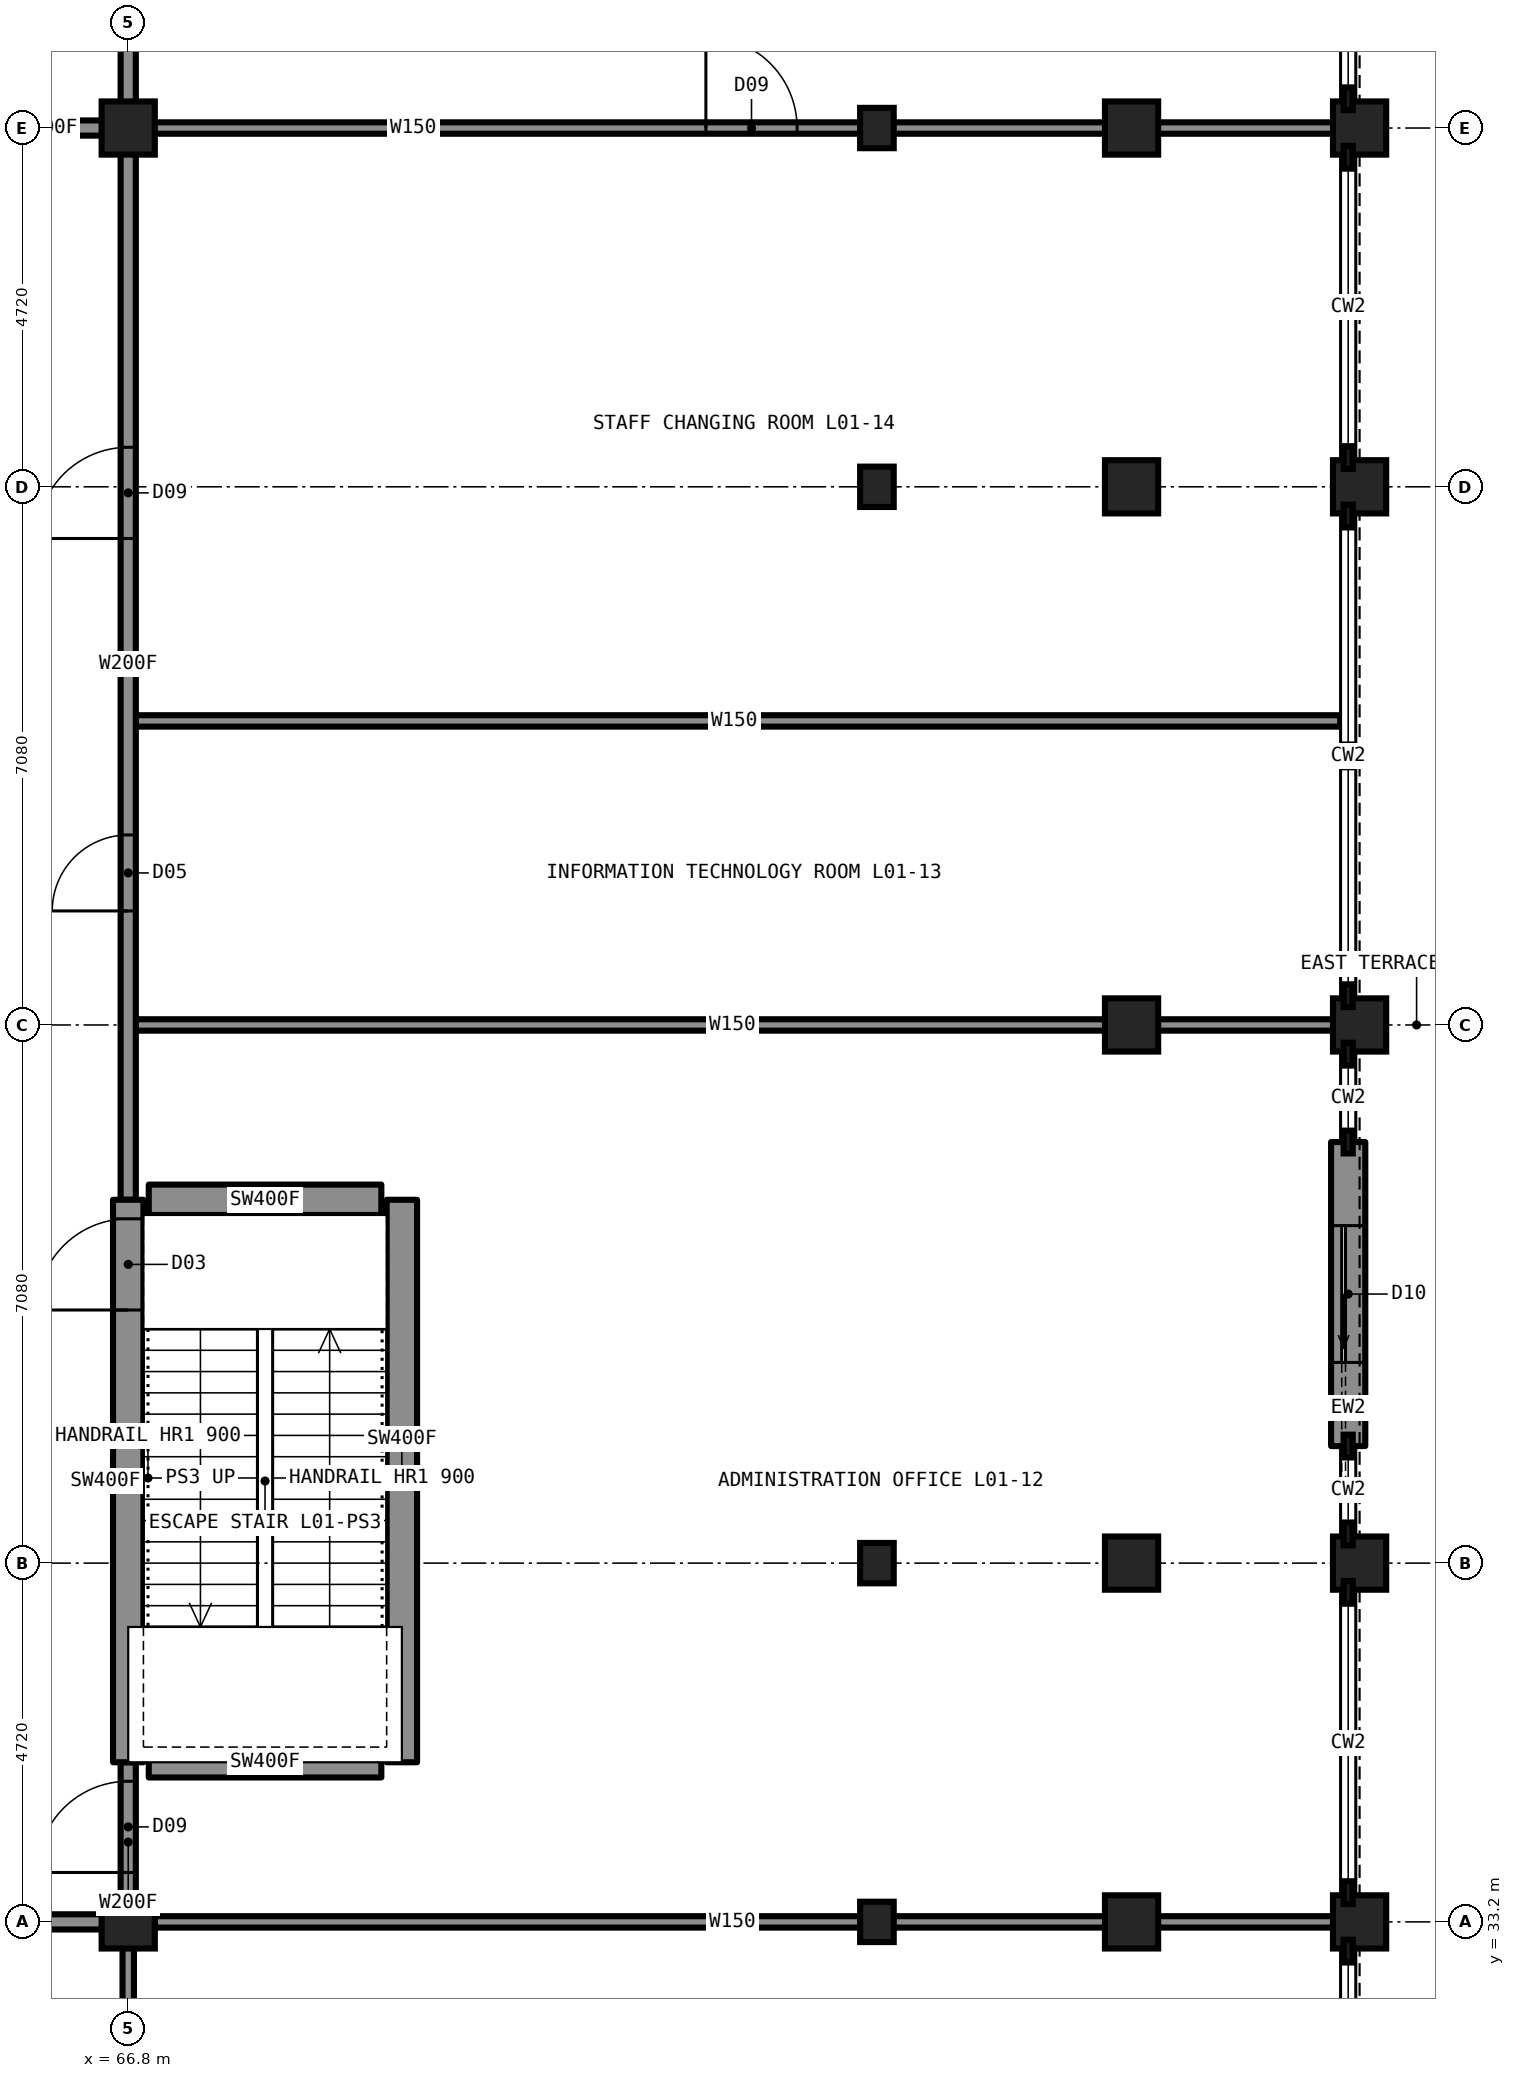
"""IFC4 building model, lengths in metres.
Left out: names, types, materials, properties, quantities, classifications, styles, units other than length and angle.
Written with IfcOpenShell. Run it as: python <this file> out.ifc"""

import sys

from ifc_helpers import new_model, si_unit, direction, frame, frame_2d, origin, origin_2d, place, context, subcontext, project, spatial, rectangle, hollow_rectangle, i_section, extrude, element, fill, save


model = new_model("IFC4")
c1 = context("Model", 3, precision=1e-05, world=origin(), true_north=direction((0.0, 1.0)))
c2 = subcontext(c1, "Body", "Model", "MODEL_VIEW")
j1 = project(units=[si_unit("LENGTHUNIT", "METRE"), si_unit("PLANEANGLEUNIT", "RADIAN")], contexts=[c1])
p1 = place(None, origin())
s1 = spatial("IfcSite", under=j1, at=p1, CompositionType="ELEMENT")
p2 = place(p1, origin())
s2 = spatial("IfcBuilding", under=s1, at=p2, CompositionType="ELEMENT")
p3 = place(p2, frame((0.0, 0.0, 5.6)))
s3 = spatial("IfcBuildingStorey", under=s2, at=p3, CompositionType="ELEMENT", Elevation=5.6)
for number, where, z_axis, x_axis in (
    (1, (76.65, 33.2, 0.0), (0.0, 0.0, 1.0), (1.0, 0.0, 0.0)),
    (2, (76.65, 37.92, 0.0), (0.0, 0.0, 1.0), (1.0, 0.0, 0.0)),
    (3, (76.65, 52.08, 0.0), (0.0, 0.0, 1.0), (1.0, 0.0, 0.0)),
    (4, (76.65, 56.8, 0.0), (0.0, 0.0, 1.0), (1.0, 0.0, 0.0)),
):
    element("IfcColumn", number, at=place(p3, frame(where, z_axis=z_axis, x_axis=x_axis)), inside=s3, PredefinedType="COLUMN", context=c2, shape_type="SweptSolid", body=[
        extrude(i_section(OverallWidth=0.442, OverallDepth=0.531, WebThickness=0.066, FlangeThickness=0.106, at=origin_2d()), origin(), (0.0, 0.0, 1.0), 5.4),
    ])
for number, where, z_axis, x_axis in (
    (5, (66.8, 33.2, 0.0), (0.0, 0.0, 1.0), (1.0, 0.0, 0.0)),
    (6, (66.8, 56.8, 0.0), (0.0, 0.0, 1.0), (1.0, 0.0, 0.0)),
):
    element("IfcColumn", number, at=place(p3, frame(where, z_axis=z_axis, x_axis=x_axis)), inside=s3, PredefinedType="COLUMN", context=c2, shape_type="SweptSolid", body=[
        extrude(hollow_rectangle(XDim=0.7, YDim=0.7, WallThickness=0.06, at=origin_2d()), origin(), (0.0, 0.0, 1.0), 5.4),
    ])
for number, where, z_axis, x_axis in (
    (7, (80.0, 33.2, 0.0), (0.0, 0.0, 1.0), (1.0, 0.0, 0.0)),
    (8, (80.0, 37.92, 0.0), (0.0, 0.0, 1.0), (1.0, 0.0, 0.0)),
    (9, (80.0, 45.0, 0.0), (0.0, 0.0, 1.0), (1.0, 0.0, 0.0)),
    (10, (80.0, 52.08, 0.0), (0.0, 0.0, 1.0), (1.0, 0.0, 0.0)),
    (11, (80.0, 56.8, 0.0), (0.0, 0.0, 1.0), (1.0, 0.0, 0.0)),
    (12, (83.0, 33.2, 0.0), (0.0, 0.0, 1.0), (1.0, 0.0, 0.0)),
    (13, (83.0, 37.92, 0.0), (0.0, 0.0, 1.0), (1.0, 0.0, 0.0)),
    (14, (83.0, 45.0, 0.0), (0.0, 0.0, 1.0), (1.0, 0.0, 0.0)),
    (15, (83.0, 52.08, 0.0), (0.0, 0.0, 1.0), (1.0, 0.0, 0.0)),
    (16, (83.0, 56.8, 0.0), (0.0, 0.0, 1.0), (1.0, 0.0, 0.0)),
):
    element("IfcColumn", number, at=place(p3, frame(where, z_axis=z_axis, x_axis=x_axis)), inside=s3, PredefinedType="COLUMN", context=c2, shape_type="SweptSolid", body=[
        extrude(rectangle(XDim=0.7, YDim=0.7, at=origin_2d()), origin(), (0.0, 0.0, 1.0), 5.4),
    ])
p4 = place(p3, frame((52.7, 33.2, 0.0), z_axis=(0.0, 0.0, 1.0), x_axis=(1.0, 0.0, 0.0)))
e17 = element("IfcWall", 17, at=p4, inside=s3, PredefinedType="PARTITIONING", context=c2, shape_type="SweptSolid", body=[
    extrude(rectangle(XDim=14.1, YDim=0.2, at=frame_2d((7.05, 0.0))), origin(), (0.0, 0.0, 1.0), 5.05),
])
p5 = place(p4, frame((5.4, 0.0, 0.0)))
e18 = element("IfcOpeningElement", 18, at=p5, cuts=e17, PredefinedType="OPENING", context=c2, shape_type="SweptSolid", body=[
    extrude(rectangle(XDim=1.8, YDim=2.2, at=frame_2d((0.9, 1.1))), frame((0.0, 0.11, 0.0), z_axis=(0.0, -1.0, 0.0), x_axis=(1.0, 0.0, 0.0)), (0.0, 0.0, 1.0), 0.22),
])
p6 = place(p3, frame((66.8, 33.2, 0.0), z_axis=(0.0, 0.0, 1.0), x_axis=(1.0, 0.0, 0.0)))
e19 = element("IfcWall", 19, at=p6, inside=s3, PredefinedType="PARTITIONING", context=c2, shape_type="SweptSolid", body=[
    extrude(rectangle(XDim=15.9, YDim=0.15, at=frame_2d((7.95, 0.0))), origin(), (0.0, 0.0, 1.0), 5.05),
])
for number, where, z_axis, x_axis in (
    (20, (67.07, 42.7, 0.0), (0.0, 0.0, 1.0), (1.0, 0.0, 0.0)),
    (21, (67.07, 35.3, 0.0), (0.0, 0.0, 1.0), (1.0, 0.0, 0.0)),
):
    element("IfcWall", number, at=place(p3, frame(where, z_axis=z_axis, x_axis=x_axis)), inside=s3, PredefinedType="SHEAR", context=c2, shape_type="SweptSolid", body=[
        extrude(rectangle(XDim=3.06, YDim=0.4, at=frame_2d((1.53, 0.0))), origin(), (0.0, 0.0, 1.0), 5.4),
    ])
p7 = place(p3, frame((66.8, 45.0, 0.0), z_axis=(0.0, 0.0, 1.0), x_axis=(1.0, 0.0, 0.0)))
e22 = element("IfcWall", 22, at=p7, inside=s3, PredefinedType="PARTITIONING", context=c2, shape_type="SweptSolid", body=[
    extrude(rectangle(XDim=15.9, YDim=0.15, at=frame_2d((7.95, 0.0))), origin(), (0.0, 0.0, 1.0), 5.05),
])
p8 = place(p3, frame((64.7, 56.8, 0.0), z_axis=(0.0, 0.0, 1.0), x_axis=(1.0, 0.0, 0.0)))
e23 = element("IfcWall", 23, at=p8, inside=s3, PredefinedType="PARTITIONING", context=c2, shape_type="SweptSolid", body=[
    extrude(rectangle(XDim=2.1, YDim=0.2, at=frame_2d((1.05, 0.0))), origin(), (0.0, 0.0, 1.0), 5.05),
])
p9 = place(p3, frame((66.8, 56.8, 0.0), z_axis=(0.0, 0.0, 1.0), x_axis=(1.0, 0.0, 0.0)))
e24 = element("IfcWall", 24, at=p9, inside=s3, PredefinedType="PARTITIONING", context=c2, shape_type="SweptSolid", body=[
    extrude(rectangle(XDim=15.9, YDim=0.15, at=frame_2d((7.95, 0.0))), origin(), (0.0, 0.0, 1.0), 5.05),
])
p10 = place(p9, frame((7.6, 0.0, 0.0)))
e25 = element("IfcOpeningElement", 25, at=p10, cuts=e24, PredefinedType="OPENING", context=c2, shape_type="SweptSolid", body=[
    extrude(rectangle(XDim=1.2, YDim=2.2, at=frame_2d((0.6, 1.1))), frame((0.0, 0.085, 0.0), z_axis=(0.0, -1.0, 0.0), x_axis=(1.0, 0.0, 0.0)), (0.0, 0.0, 1.0), 0.17),
])
p11 = place(p3, frame((66.8, 49.0, 0.0), z_axis=(0.0, 0.0, 1.0), x_axis=(1.0, 0.0, 0.0)))
e26 = element("IfcWall", 26, at=p11, inside=s3, PredefinedType="PARTITIONING", context=c2, shape_type="SweptSolid", body=[
    extrude(rectangle(XDim=15.945, YDim=0.15, at=frame_2d((7.973, 0.0))), origin(), (0.0, 0.0, 1.0), 5.05),
])
p12 = place(p3, frame((66.8, 33.2, 0.0), z_axis=(0.0, 0.0, 1.0), x_axis=(0.0, 1.0, 0.0)))
e27 = element("IfcWall", 27, at=p12, inside=s3, PredefinedType="PARTITIONING", context=c2, shape_type="SweptSolid", body=[
    extrude(rectangle(XDim=2.1, YDim=0.2, at=frame_2d((1.05, 0.0))), origin(), (0.0, 0.0, 1.0), 5.05),
])
p13 = place(p12, frame((0.65, 0.0, 0.0)))
e28 = element("IfcOpeningElement", 28, at=p13, cuts=e27, PredefinedType="OPENING", context=c2, shape_type="SweptSolid", body=[
    extrude(rectangle(XDim=1.2, YDim=2.2, at=frame_2d((0.6, 1.1))), frame((0.0, 0.11, 0.0), z_axis=(0.0, -1.0, 0.0), x_axis=(1.0, 0.0, 0.0)), (0.0, 0.0, 1.0), 0.22),
])
p14 = place(p3, frame((66.8, 42.7, 0.0), z_axis=(0.0, 0.0, 1.0), x_axis=(0.0, 1.0, 0.0)))
e29 = element("IfcWall", 29, at=p14, inside=s3, PredefinedType="PARTITIONING", context=c2, shape_type="SweptSolid", body=[
    extrude(rectangle(XDim=14.1, YDim=0.2, at=frame_2d((7.05, 0.0))), origin(), (0.0, 0.0, 1.0), 5.05),
])
p15 = place(p14, frame((3.8, 0.0, 0.0)))
e30 = element("IfcOpeningElement", 30, at=p15, cuts=e29, PredefinedType="OPENING", context=c2, shape_type="SweptSolid", body=[
    extrude(rectangle(XDim=1.0, YDim=2.1, at=frame_2d((0.5, 1.05))), frame((0.0, 0.11, 0.0), z_axis=(0.0, -1.0, 0.0), x_axis=(1.0, 0.0, 0.0)), (0.0, 0.0, 1.0), 0.22),
])
p16 = place(p14, frame((8.7, 0.0, 0.0)))
e31 = element("IfcOpeningElement", 31, at=p16, cuts=e29, PredefinedType="OPENING", context=c2, shape_type="SweptSolid", body=[
    extrude(rectangle(XDim=1.2, YDim=2.2, at=frame_2d((0.6, 1.1))), frame((0.0, 0.11, 0.0), z_axis=(0.0, -1.0, 0.0), x_axis=(1.0, 0.0, 0.0)), (0.0, 0.0, 1.0), 0.22),
])
p17 = place(p3, frame((66.8, 56.8, 0.0), z_axis=(0.0, 0.0, 1.0), x_axis=(0.0, 1.0, 0.0)))
e32 = element("IfcWall", 32, at=p17, inside=s3, PredefinedType="PARTITIONING", context=c2, shape_type="SweptSolid", body=[
    extrude(rectangle(XDim=13.9, YDim=0.2, at=frame_2d((6.95, 0.0))), origin(), (0.0, 0.0, 1.0), 5.05),
])
p18 = place(p17, frame((6.7, 0.0, 0.0)))
e33 = element("IfcOpeningElement", 33, at=p18, cuts=e32, PredefinedType="OPENING", context=c2, shape_type="SweptSolid", body=[
    extrude(rectangle(XDim=1.0, YDim=2.1, at=frame_2d((0.5, 1.05))), frame((0.0, 0.11, 0.0), z_axis=(0.0, -1.0, 0.0), x_axis=(1.0, 0.0, 0.0)), (0.0, 0.0, 1.0), 0.22),
])
p19 = place(p3, frame((66.8, 19.3, 0.0), z_axis=(0.0, 0.0, 1.0), x_axis=(0.0, 1.0, 0.0)))
e34 = element("IfcWall", 34, at=p19, inside=s3, PredefinedType="PARTITIONING", context=c2, shape_type="SweptSolid", body=[
    extrude(rectangle(XDim=13.9, YDim=0.15, at=frame_2d((6.95, 0.0))), origin(), (0.0, 0.0, 1.0), 5.05),
])
p20 = place(p19, frame((6.1, 0.0, 0.0)))
e35 = element("IfcOpeningElement", 35, at=p20, cuts=e34, PredefinedType="OPENING", context=c2, shape_type="SweptSolid", body=[
    extrude(rectangle(XDim=1.2, YDim=2.2, at=frame_2d((0.6, 1.1))), frame((0.0, 0.085, 0.0), z_axis=(0.0, -1.0, 0.0), x_axis=(1.0, 0.0, 0.0)), (0.0, 0.0, 1.0), 0.17),
])
p21 = place(p3, frame((66.8, 35.3, 0.0), z_axis=(0.0, 0.0, 1.0), x_axis=(0.0, 1.0, 0.0)))
e36 = element("IfcWall", 36, at=p21, inside=s3, PredefinedType="SHEAR", context=c2, shape_type="SweptSolid", body=[
    extrude(rectangle(XDim=7.4, YDim=0.4, at=frame_2d((3.7, 0.0))), origin(), (0.0, 0.0, 1.0), 5.4),
])
p22 = place(p21, frame((5.95, 0.0, 0.0)))
e37 = element("IfcOpeningElement", 37, at=p22, cuts=e36, PredefinedType="OPENING", context=c2, shape_type="SweptSolid", body=[
    extrude(rectangle(XDim=1.2, YDim=2.2, at=frame_2d((0.6, 1.1))), frame((0.0, 0.21, 0.0), z_axis=(0.0, -1.0, 0.0), x_axis=(1.0, 0.0, 0.0)), (0.0, 0.0, 1.0), 0.42),
])
p23 = place(p3, frame((70.4, 35.3, 0.0), z_axis=(0.0, 0.0, 1.0), x_axis=(0.0, 1.0, 0.0)))
e38 = element("IfcWall", 38, at=p23, inside=s3, PredefinedType="SHEAR", context=c2, shape_type="SweptSolid", body=[
    extrude(rectangle(XDim=7.4, YDim=0.4, at=frame_2d((3.7, 0.0))), origin(), (0.0, 0.0, 1.0), 5.4),
])
p24 = place(p3, frame((82.85, 39.46, 0.0), z_axis=(0.0, 0.0, 1.0), x_axis=(0.0, 1.0, 0.0)))
e39 = element("IfcWall", 39, at=p24, inside=s3, PredefinedType="SOLIDWALL", context=c2, shape_type="SweptSolid", body=[
    extrude(rectangle(XDim=4.0, YDim=0.45, at=frame_2d((2.0, 0.0))), origin(), (0.0, 0.0, 1.0), 5.05),
])
p25 = place(p24, frame((1.1, 0.0, 0.0)))
e40 = element("IfcOpeningElement", 40, at=p25, cuts=e39, PredefinedType="OPENING", context=c2, shape_type="SweptSolid", body=[
    extrude(rectangle(XDim=1.8, YDim=2.4, at=frame_2d((0.9, 1.2))), frame((0.0, 0.235, 0.0), z_axis=(0.0, -1.0, 0.0), x_axis=(1.0, 0.0, 0.0)), (0.0, 0.0, 1.0), 0.47),
])
p26 = place(p22, origin())
e41 = element("IfcDoor", 41, at=p26, inside=s3, OperationType="SINGLE_SWING_LEFT", PredefinedType="DOOR", context=c2, shape_type="SweptSolid", body=[
    extrude(rectangle(XDim=1.2, YDim=2.2, at=frame_2d((0.6, 1.1))), frame((0.0, 0.025, 0.0), z_axis=(0.0, -1.0, 0.0), x_axis=(1.0, 0.0, 0.0)), (0.0, 0.0, 1.0), 0.05),
])
fill(e37, e41)
p27 = place(p10, origin())
e42 = element("IfcDoor", 42, at=p27, inside=s3, OperationType="SINGLE_SWING_LEFT", PredefinedType="DOOR", context=c2, shape_type="SweptSolid", body=[
    extrude(rectangle(XDim=1.2, YDim=2.2, at=frame_2d((0.6, 1.1))), frame((0.0, 0.025, 0.0), z_axis=(0.0, -1.0, 0.0), x_axis=(1.0, 0.0, 0.0)), (0.0, 0.0, 1.0), 0.05),
])
fill(e25, e42)
p28 = place(p13, origin())
e43 = element("IfcDoor", 43, at=p28, inside=s3, OperationType="SINGLE_SWING_LEFT", PredefinedType="DOOR", context=c2, shape_type="SweptSolid", body=[
    extrude(rectangle(XDim=1.2, YDim=2.2, at=frame_2d((0.6, 1.1))), frame((0.0, 0.025, 0.0), z_axis=(0.0, -1.0, 0.0), x_axis=(1.0, 0.0, 0.0)), (0.0, 0.0, 1.0), 0.05),
])
fill(e28, e43)
p29 = place(p15, origin())
e44 = element("IfcDoor", 44, at=p29, inside=s3, OperationType="SINGLE_SWING_LEFT", PredefinedType="DOOR", context=c2, shape_type="SweptSolid", body=[
    extrude(rectangle(XDim=1.0, YDim=2.1, at=frame_2d((0.5, 1.05))), frame((0.0, 0.025, 0.0), z_axis=(0.0, -1.0, 0.0), x_axis=(1.0, 0.0, 0.0)), (0.0, 0.0, 1.0), 0.05),
])
fill(e30, e44)
p30 = place(p16, origin())
e45 = element("IfcDoor", 45, at=p30, inside=s3, OperationType="SINGLE_SWING_LEFT", PredefinedType="DOOR", context=c2, shape_type="SweptSolid", body=[
    extrude(rectangle(XDim=1.2, YDim=2.2, at=frame_2d((0.6, 1.1))), frame((0.0, 0.025, 0.0), z_axis=(0.0, -1.0, 0.0), x_axis=(1.0, 0.0, 0.0)), (0.0, 0.0, 1.0), 0.05),
])
fill(e31, e45)
p31 = place(p25, origin())
e46 = element("IfcDoor", 46, at=p31, inside=s3, OperationType="SLIDING_TO_LEFT", PredefinedType="DOOR", context=c2, shape_type="SweptSolid", body=[
    extrude(rectangle(XDim=1.8, YDim=2.4, at=frame_2d((0.9, 1.2))), frame((0.0, 0.025, 0.0), z_axis=(0.0, -1.0, 0.0), x_axis=(1.0, 0.0, 0.0)), (0.0, 0.0, 1.0), 0.05),
])
fill(e40, e46)
save(model, sys.argv[1])
